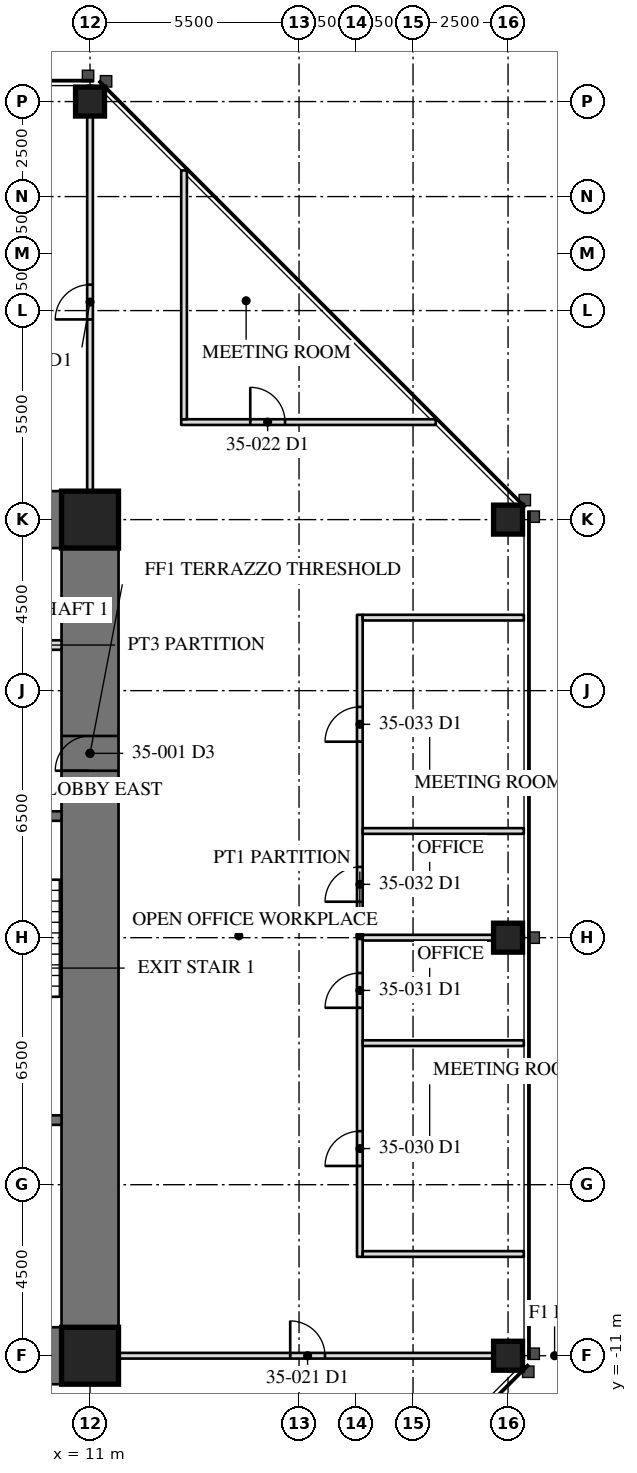
"""IFC4 building model, lengths in metres.
Left out: names, types, materials, properties, quantities, classifications, styles, units other than length and angle.
Written with IfcOpenShell. Run it as: python <this file> out.ifc"""

import sys

from ifc_helpers import new_model, si_unit, direction, frame, frame_2d, origin, origin_2d, place, context, subcontext, project, spatial, rectangle, hollow_rectangle, extrude, element, fill, save


model = new_model("IFC4")
c1 = context("Model", 3, precision=1e-05, world=origin(), true_north=direction((0.0, 1.0)))
c2 = subcontext(c1, "Body", "Model", "MODEL_VIEW")
j1 = project(units=[si_unit("LENGTHUNIT", "METRE"), si_unit("PLANEANGLEUNIT", "RADIAN")], contexts=[c1])
p1 = place(None, origin())
s1 = spatial("IfcSite", under=j1, at=p1, CompositionType="ELEMENT")
p2 = place(p1, origin())
s2 = spatial("IfcBuilding", under=s1, at=p2, CompositionType="ELEMENT")
p3 = place(p2, frame((0.0, 0.0, 150.0)))
s3 = spatial("IfcBuildingStorey", under=s2, at=p3, CompositionType="ELEMENT", Elevation=150.0)
for number, where, z_axis, x_axis in (
    (1, (22.0, -11.0, 0.0), (0.0, 0.0, 1.0), (0.0, 1.0, 0.0)),
    (2, (22.0, 0.0, 0.0), (0.0, 0.0, 1.0), (0.0, 1.0, 0.0)),
    (3, (22.0, 11.0, 0.0), (0.0, 0.0, 1.0), (0.0, 1.0, 0.0)),
    (4, (11.0, 22.0, 0.0), (0.0, 0.0, 1.0), (1.0, 0.0, 0.0)),
):
    element("IfcColumn", number, at=place(p3, frame(where, z_axis=z_axis, x_axis=x_axis)), inside=s3, PredefinedType="COLUMN", context=c2, shape_type="SweptSolid", body=[
        extrude(hollow_rectangle(XDim=0.762, YDim=0.762, WallThickness=0.076, at=origin_2d()), origin(), (0.0, 0.0, 1.0), 4.1),
    ])
p4 = place(p3, frame((11.0, -11.0, 0.0), z_axis=(0.0, 0.0, 1.0), x_axis=(0.0, 1.0, 0.0)))
e5 = element("IfcWall", 5, at=p4, inside=s3, PredefinedType="SHEAR", context=c2, shape_type="SweptSolid", body=[
    extrude(rectangle(XDim=22.0, YDim=1.5, at=frame_2d((11.0, 0.0))), origin(), (0.0, 0.0, 1.0), 4.1),
])
p5 = place(p4, frame((15.393, 0.0, 0.0)))
e6 = element("IfcOpeningElement", 6, at=p5, cuts=e5, PredefinedType="OPENING", context=c2, shape_type="SweptSolid", body=[
    extrude(rectangle(XDim=0.915, YDim=2.134, at=frame_2d((0.458, 1.067))), frame((0.0, 0.76, 0.0), z_axis=(0.0, -1.0, 0.0), x_axis=(1.0, 0.0, 0.0)), (0.0, 0.0, 1.0), 1.52),
])
for number, where, z_axis, x_axis in (
    (7, (11.0, 11.0, 0.0), (0.0, 0.0, 1.0), (-1.0, 0.0, 0.0)),
    (8, (6.5, -11.0, 0.0), (0.0, 0.0, 1.0), (1.0, 0.0, 0.0)),
):
    element("IfcWall", number, at=place(p3, frame(where, z_axis=z_axis, x_axis=x_axis)), inside=s3, PredefinedType="SHEAR", context=c2, shape_type="SweptSolid", body=[
        extrude(rectangle(XDim=4.5, YDim=1.5, at=frame_2d((2.25, 0.0))), origin(), (0.0, 0.0, 1.0), 4.1),
    ])
for number, where, z_axis, x_axis in (
    (9, (11.0, 11.0, 0.0), (0.0, 0.0, 1.0), (1.0, 0.0, 0.0)),
    (10, (11.0, -11.0, 0.0), (0.0, 0.0, 1.0), (1.0, 0.0, 0.0)),
):
    element("IfcColumn", number, at=place(p3, frame(where, z_axis=z_axis, x_axis=x_axis)), inside=s3, PredefinedType="COLUMN", context=c2, shape_type="SweptSolid", body=[
        extrude(hollow_rectangle(XDim=1.499, YDim=1.499, WallThickness=0.102, at=origin_2d()), origin(), (0.0, 0.0, 1.0), 4.1),
    ])
p6 = place(p3, frame((6.95, -4.8, 0.0), z_axis=(0.0, 0.0, 1.0), x_axis=(1.0, 0.0, 0.0)))
e11 = element("IfcWall", 11, at=p6, inside=s3, PredefinedType="SOLIDWALL", context=c2, shape_type="SweptSolid", body=[
    extrude(rectangle(XDim=3.3, YDim=0.25, at=frame_2d((1.65, 0.0))), origin(), (0.0, 0.0, 1.0), 3.91),
])
p7 = place(p3, frame((6.95, 3.2, 0.0), z_axis=(0.0, 0.0, 1.0), x_axis=(1.0, 0.0, 0.0)))
e12 = element("IfcWall", 12, at=p7, inside=s3, PredefinedType="SOLIDWALL", context=c2, shape_type="SweptSolid", body=[
    extrude(rectangle(XDim=3.3, YDim=0.25, at=frame_2d((1.65, 0.0))), origin(), (0.0, 0.0, 1.0), 3.91),
])
p8 = place(p7, frame((1.116, 0.0, 0.0)))
e13 = element("IfcOpeningElement", 13, at=p8, cuts=e12, PredefinedType="OPENING", context=c2, shape_type="SweptSolid", body=[
    extrude(rectangle(XDim=1.067, YDim=2.134, at=frame_2d((0.533, 1.067))), frame((0.0, 0.135, 0.0), z_axis=(0.0, -1.0, 0.0), x_axis=(1.0, 0.0, 0.0)), (0.0, 0.0, 1.0), 0.27),
])
p9 = place(p3, frame((6.95, 7.7, 0.0), z_axis=(0.0, 0.0, 1.0), x_axis=(1.0, 0.0, 0.0)))
e14 = element("IfcWall", 14, at=p9, inside=s3, PredefinedType="PARTITIONING", context=c2, shape_type="SweptSolid", body=[
    extrude(rectangle(XDim=3.3, YDim=0.25, at=frame_2d((1.65, 0.0))), origin(), (0.0, 0.0, 1.0), 3.91),
])
p10 = place(p9, frame((0.45, 0.0, 0.0)))
e15 = element("IfcOpeningElement", 15, at=p10, cuts=e14, PredefinedType="OPENING", context=c2, shape_type="SweptSolid", body=[
    extrude(rectangle(XDim=1.219, YDim=2.134, at=frame_2d((0.609, 1.067))), frame((0.0, 0.135, 0.0), z_axis=(0.0, -1.0, 0.0), x_axis=(1.0, 0.0, 0.0)), (0.0, 0.0, 1.0), 0.27),
])
p11 = place(p3, frame((11.0, 11.75, 0.0), z_axis=(0.0, 0.0, 1.0), x_axis=(0.0, 1.0, 0.0)))
e16 = element("IfcWall", 16, at=p11, inside=s3, PredefinedType="PARTITIONING", context=c2, shape_type="SweptSolid", body=[
    extrude(rectangle(XDim=10.665, YDim=0.15, at=frame_2d((5.333, 0.0))), origin(), (0.0, 0.0, 1.0), 3.326),
])
p12 = place(p11, frame((4.518, 0.0, 0.0)))
e17 = element("IfcOpeningElement", 17, at=p12, cuts=e16, PredefinedType="OPENING", context=c2, shape_type="SweptSolid", body=[
    extrude(rectangle(XDim=0.915, YDim=2.134, at=frame_2d((0.458, 1.067))), frame((0.0, 0.085, 0.0), z_axis=(0.0, -1.0, 0.0), x_axis=(1.0, 0.0, 0.0)), (0.0, 0.0, 1.0), 0.17),
])
p13 = place(p3, frame((11.75, -11.0, 0.0), z_axis=(0.0, 0.0, 1.0), x_axis=(1.0, 0.0, 0.0)))
e18 = element("IfcWall", 18, at=p13, inside=s3, PredefinedType="PARTITIONING", context=c2, shape_type="SweptSolid", body=[
    extrude(rectangle(XDim=10.665, YDim=0.15, at=frame_2d((5.333, 0.0))), origin(), (0.0, 0.0, 1.0), 3.326),
])
p14 = place(p13, frame((4.518, 0.0, 0.0)))
e19 = element("IfcOpeningElement", 19, at=p14, cuts=e18, PredefinedType="OPENING", context=c2, shape_type="SweptSolid", body=[
    extrude(rectangle(XDim=0.915, YDim=2.134, at=frame_2d((0.458, 1.067))), frame((0.0, 0.085, 0.0), z_axis=(0.0, -1.0, 0.0), x_axis=(1.0, 0.0, 0.0)), (0.0, 0.0, 1.0), 0.17),
])
p15 = place(p3, frame((13.399, 13.566, 0.0), z_axis=(0.0, 0.0, 1.0), x_axis=(1.0, 0.0, 0.0)))
e20 = element("IfcWall", 20, at=p15, inside=s3, PredefinedType="PARTITIONING", context=c2, shape_type="SweptSolid", body=[
    extrude(rectangle(XDim=6.698, YDim=0.15, at=frame_2d((3.349, 0.0))), origin(), (0.0, 0.0, 1.0), 3.91),
])
p16 = place(p15, frame((1.817, 0.0, 0.0)))
e21 = element("IfcOpeningElement", 21, at=p16, cuts=e20, PredefinedType="OPENING", context=c2, shape_type="SweptSolid", body=[
    extrude(rectangle(XDim=0.915, YDim=2.134, at=frame_2d((0.458, 1.067))), frame((0.0, 0.085, 0.0), z_axis=(0.0, -1.0, 0.0), x_axis=(1.0, 0.0, 0.0)), (0.0, 0.0, 1.0), 0.17),
])
p17 = place(p3, frame((13.474, 13.641, 0.0), z_axis=(0.0, 0.0, 1.0), x_axis=(0.0, 1.0, 0.0)))
e22 = element("IfcWall", 22, at=p17, inside=s3, PredefinedType="PARTITIONING", context=c2, shape_type="SweptSolid", body=[
    extrude(rectangle(XDim=6.548, YDim=0.15, at=frame_2d((3.274, 0.0))), origin(), (0.0, 0.0, 1.0), 3.91),
])
p18 = place(p3, frame((18.1, -8.398, 0.0), z_axis=(0.0, 0.0, 1.0), x_axis=(0.0, 1.0, 0.0)))
e23 = element("IfcWall", 23, at=p18, inside=s3, PredefinedType="PARTITIONING", context=c2, shape_type="SweptSolid", body=[
    extrude(rectangle(XDim=16.894, YDim=0.15, at=frame_2d((8.447, 0.0))), origin(), (0.0, 0.0, 1.0), 3.91),
])
p19 = place(p18, frame((2.392, 0.0, 0.0)))
e24 = element("IfcOpeningElement", 24, at=p19, cuts=e23, PredefinedType="OPENING", context=c2, shape_type="SweptSolid", body=[
    extrude(rectangle(XDim=0.915, YDim=2.134, at=frame_2d((0.458, 1.067))), frame((0.0, 0.085, 0.0), z_axis=(0.0, -1.0, 0.0), x_axis=(1.0, 0.0, 0.0)), (0.0, 0.0, 1.0), 0.17),
])
p20 = place(p18, frame((6.553, 0.0, 0.0)))
e25 = element("IfcOpeningElement", 25, at=p20, cuts=e23, PredefinedType="OPENING", context=c2, shape_type="SweptSolid", body=[
    extrude(rectangle(XDim=0.915, YDim=2.134, at=frame_2d((0.458, 1.067))), frame((0.0, 0.085, 0.0), z_axis=(0.0, -1.0, 0.0), x_axis=(1.0, 0.0, 0.0)), (0.0, 0.0, 1.0), 0.17),
])
p21 = place(p18, frame((9.344, 0.0, 0.0)))
e26 = element("IfcOpeningElement", 26, at=p21, cuts=e23, PredefinedType="OPENING", context=c2, shape_type="SweptSolid", body=[
    extrude(rectangle(XDim=0.915, YDim=2.134, at=frame_2d((0.458, 1.067))), frame((0.0, 0.085, 0.0), z_axis=(0.0, -1.0, 0.0), x_axis=(1.0, 0.0, 0.0)), (0.0, 0.0, 1.0), 0.17),
])
p22 = place(p18, frame((13.554, 0.0, 0.0)))
e27 = element("IfcOpeningElement", 27, at=p22, cuts=e23, PredefinedType="OPENING", context=c2, shape_type="SweptSolid", body=[
    extrude(rectangle(XDim=0.915, YDim=2.134, at=frame_2d((0.458, 1.067))), frame((0.0, 0.085, 0.0), z_axis=(0.0, -1.0, 0.0), x_axis=(1.0, 0.0, 0.0)), (0.0, 0.0, 1.0), 0.17),
])
for number, where, z_axis, x_axis in (
    (28, (18.175, -8.323, 0.0), (0.0, 0.0, 1.0), (1.0, 0.0, 0.0)),
    (29, (18.175, -2.775, 0.0), (0.0, 0.0, 1.0), (1.0, 0.0, 0.0)),
):
    element("IfcWall", number, at=place(p3, frame(where, z_axis=z_axis, x_axis=x_axis)), inside=s3, PredefinedType="PARTITIONING", context=c2, shape_type="SweptSolid", body=[
        extrude(rectangle(XDim=4.24, YDim=0.15, at=frame_2d((2.12, 0.0))), origin(), (0.0, 0.0, 1.0), 3.91),
    ])
p23 = place(p3, frame((18.175, 0.0, 0.0), z_axis=(0.0, 0.0, 1.0), x_axis=(1.0, 0.0, 0.0)))
e30 = element("IfcWall", 30, at=p23, inside=s3, PredefinedType="PARTITIONING", context=c2, shape_type="SweptSolid", body=[
    extrude(rectangle(XDim=4.24, YDim=0.15, at=frame_2d((2.12, 0.0))), origin(), (0.0, 0.0, 1.0), 3.326),
])
for number, where, z_axis, x_axis in (
    (31, (18.175, 2.807, 0.0), (0.0, 0.0, 1.0), (1.0, 0.0, 0.0)),
    (32, (18.175, 8.421, 0.0), (0.0, 0.0, 1.0), (1.0, 0.0, 0.0)),
):
    element("IfcWall", number, at=place(p3, frame(where, z_axis=z_axis, x_axis=x_axis)), inside=s3, PredefinedType="PARTITIONING", context=c2, shape_type="SweptSolid", body=[
        extrude(rectangle(XDim=4.24, YDim=0.15, at=frame_2d((2.12, 0.0))), origin(), (0.0, 0.0, 1.0), 3.91),
    ])
p24 = place(p5, origin())
e33 = element("IfcDoor", 33, at=p24, inside=s3, OperationType="SINGLE_SWING_RIGHT", PredefinedType="DOOR", context=c2, shape_type="SweptSolid", body=[
    extrude(rectangle(XDim=0.915, YDim=2.134, at=frame_2d((0.458, 1.067))), frame((0.0, -0.675, 0.0), z_axis=(0.0, -1.0, 0.0), x_axis=(1.0, 0.0, 0.0)), (0.0, 0.0, 1.0), 0.05),
])
fill(e6, e33)
p25 = place(p12, origin())
e34 = element("IfcDoor", 34, at=p25, inside=s3, OperationType="SINGLE_SWING_LEFT", PredefinedType="DOOR", context=c2, shape_type="SweptSolid", body=[
    extrude(rectangle(XDim=0.915, YDim=2.134, at=frame_2d((0.458, 1.067))), frame((0.0, 0.025, 0.0), z_axis=(0.0, -1.0, 0.0), x_axis=(1.0, 0.0, 0.0)), (0.0, 0.0, 1.0), 0.05),
])
fill(e17, e34)
p26 = place(p14, origin())
e35 = element("IfcDoor", 35, at=p26, inside=s3, OperationType="SINGLE_SWING_LEFT", PredefinedType="DOOR", context=c2, shape_type="SweptSolid", body=[
    extrude(rectangle(XDim=0.915, YDim=2.134, at=frame_2d((0.458, 1.067))), frame((0.0, 0.025, 0.0), z_axis=(0.0, -1.0, 0.0), x_axis=(1.0, 0.0, 0.0)), (0.0, 0.0, 1.0), 0.05),
])
fill(e19, e35)
p27 = place(p16, origin())
e36 = element("IfcDoor", 36, at=p27, inside=s3, OperationType="SINGLE_SWING_LEFT", PredefinedType="DOOR", context=c2, shape_type="SweptSolid", body=[
    extrude(rectangle(XDim=0.915, YDim=2.134, at=frame_2d((0.458, 1.067))), frame((0.0, 0.025, 0.0), z_axis=(0.0, -1.0, 0.0), x_axis=(1.0, 0.0, 0.0)), (0.0, 0.0, 1.0), 0.05),
])
fill(e21, e36)
p28 = place(p19, origin())
e37 = element("IfcDoor", 37, at=p28, inside=s3, OperationType="SINGLE_SWING_LEFT", PredefinedType="DOOR", context=c2, shape_type="SweptSolid", body=[
    extrude(rectangle(XDim=0.915, YDim=2.134, at=frame_2d((0.458, 1.067))), frame((0.0, 0.025, 0.0), z_axis=(0.0, -1.0, 0.0), x_axis=(1.0, 0.0, 0.0)), (0.0, 0.0, 1.0), 0.05),
])
fill(e24, e37)
p29 = place(p20, origin())
e38 = element("IfcDoor", 38, at=p29, inside=s3, OperationType="SINGLE_SWING_LEFT", PredefinedType="DOOR", context=c2, shape_type="SweptSolid", body=[
    extrude(rectangle(XDim=0.915, YDim=2.134, at=frame_2d((0.458, 1.067))), frame((0.0, 0.025, 0.0), z_axis=(0.0, -1.0, 0.0), x_axis=(1.0, 0.0, 0.0)), (0.0, 0.0, 1.0), 0.05),
])
fill(e25, e38)
p30 = place(p21, origin())
e39 = element("IfcDoor", 39, at=p30, inside=s3, OperationType="SINGLE_SWING_LEFT", PredefinedType="DOOR", context=c2, shape_type="SweptSolid", body=[
    extrude(rectangle(XDim=0.915, YDim=2.134, at=frame_2d((0.458, 1.067))), frame((0.0, 0.025, 0.0), z_axis=(0.0, -1.0, 0.0), x_axis=(1.0, 0.0, 0.0)), (0.0, 0.0, 1.0), 0.05),
])
fill(e26, e39)
p31 = place(p22, origin())
e40 = element("IfcDoor", 40, at=p31, inside=s3, OperationType="SINGLE_SWING_LEFT", PredefinedType="DOOR", context=c2, shape_type="SweptSolid", body=[
    extrude(rectangle(XDim=0.915, YDim=2.134, at=frame_2d((0.458, 1.067))), frame((0.0, 0.025, 0.0), z_axis=(0.0, -1.0, 0.0), x_axis=(1.0, 0.0, 0.0)), (0.0, 0.0, 1.0), 0.05),
])
fill(e27, e40)
save(model, sys.argv[1])
